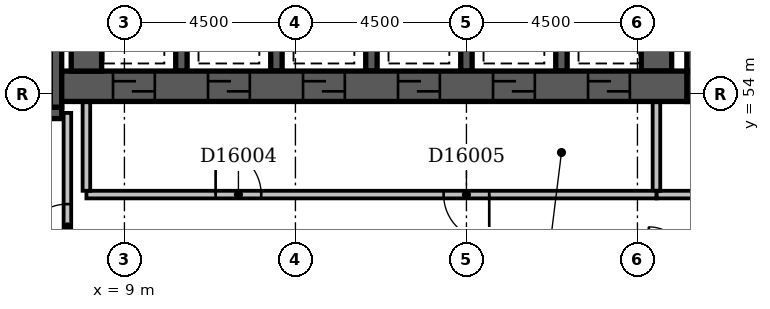
"""IFC4 building model, lengths in metres.
Left out: names, types, materials, properties, quantities, classifications, styles, units other than length and angle.
Written with IfcOpenShell. Run it as: python <this file> out.ifc"""

import sys

from ifc_helpers import new_model, si_unit, direction, frame, frame_2d, origin, place, context, subcontext, project, spatial, rectangle, extrude, element, fill, save


model = new_model("IFC4")
c1 = context("Model", 3, precision=1e-05, world=origin(), true_north=direction((0.0, 1.0)))
c2 = subcontext(c1, "Body", "Model", "MODEL_VIEW")
j1 = project(units=[si_unit("LENGTHUNIT", "METRE"), si_unit("PLANEANGLEUNIT", "RADIAN")], contexts=[c1])
p1 = place(None, origin())
s1 = spatial("IfcSite", under=j1, at=p1, CompositionType="ELEMENT")
p2 = place(p1, origin())
s2 = spatial("IfcBuilding", under=s1, at=p2, CompositionType="ELEMENT")
p3 = place(p2, frame((0.0, 0.0, 68.6)))
s3 = spatial("IfcBuildingStorey", under=s2, at=p3, CompositionType="ELEMENT", Elevation=68.6)
p4 = place(p3, frame((0.35, 53.5, -0.3), z_axis=(0.0, 0.0, 1.0), x_axis=(1.0, 0.0, 0.0)))
e1 = element("IfcWall", 1, at=p4, inside=s3, PredefinedType="SHEAR", context=c2, shape_type="SweptSolid", body=[
    extrude(rectangle(XDim=7.0, YDim=0.3, at=frame_2d((3.5, 0.0))), origin(), (0.0, 0.0, 1.0), 3.6),
])
p5 = place(p4, frame((5.58, 0.0, 0.3)))
e2 = element("IfcOpeningElement", 2, at=p5, cuts=e1, PredefinedType="OPENING", context=c2, shape_type="SweptSolid", body=[
    extrude(rectangle(XDim=1.1, YDim=2.1, at=frame_2d((0.55, 1.05))), frame((0.0, 0.162, 0.0), z_axis=(0.0, -1.0, 0.0), x_axis=(1.0, 0.0, 0.0)), (0.0, 0.0, 1.0), 0.324),
])
p6 = place(p3, frame((7.2, 53.65, -0.3), z_axis=(0.0, 0.0, 1.0), x_axis=(0.0, 1.0, 0.0)))
e3 = element("IfcWall", 3, at=p6, inside=s3, PredefinedType="SHEAR", context=c2, shape_type="SweptSolid", body=[
    extrude(rectangle(XDim=4.2, YDim=0.3, at=frame_2d((2.1, 0.0))), origin(), (0.0, 0.0, 1.0), 3.6),
])
p7 = place(p3, frame((7.35, 54.2, -0.3), z_axis=(0.0, 0.0, 1.0), x_axis=(1.0, 0.0, 0.0)))
e4 = element("IfcWall", 4, at=p7, inside=s3, PredefinedType="SHEAR", context=c2, shape_type="SweptSolid", body=[
    extrude(rectangle(XDim=16.45, YDim=0.8, at=frame_2d((8.225, 0.0))), origin(), (0.0, 0.0, 1.0), 3.6),
])
p8 = place(p7, frame((1.35, 0.0, 0.3)))
e5 = element("IfcOpeningElement", 5, at=p8, cuts=e4, PredefinedType="OPENING", context=c2, shape_type="SweptSolid", body=[
    extrude(rectangle(XDim=1.1, YDim=2.1, at=frame_2d((0.55, 1.05))), frame((0.0, 0.412, 0.0), z_axis=(0.0, -1.0, 0.0), x_axis=(1.0, 0.0, 0.0)), (0.0, 0.0, 1.0), 0.824),
])
p9 = place(p7, frame((3.85, 0.0, 0.3)))
e6 = element("IfcOpeningElement", 6, at=p9, cuts=e4, PredefinedType="OPENING", context=c2, shape_type="SweptSolid", body=[
    extrude(rectangle(XDim=1.1, YDim=2.1, at=frame_2d((0.55, 1.05))), frame((0.0, 0.412, 0.0), z_axis=(0.0, -1.0, 0.0), x_axis=(1.0, 0.0, 0.0)), (0.0, 0.0, 1.0), 0.824),
])
p10 = place(p7, frame((6.35, 0.0, 0.3)))
e7 = element("IfcOpeningElement", 7, at=p10, cuts=e4, PredefinedType="OPENING", context=c2, shape_type="SweptSolid", body=[
    extrude(rectangle(XDim=1.1, YDim=2.1, at=frame_2d((0.55, 1.05))), frame((0.0, 0.412, 0.0), z_axis=(0.0, -1.0, 0.0), x_axis=(1.0, 0.0, 0.0)), (0.0, 0.0, 1.0), 0.824),
])
p11 = place(p7, frame((8.85, 0.0, 0.3)))
e8 = element("IfcOpeningElement", 8, at=p11, cuts=e4, PredefinedType="OPENING", context=c2, shape_type="SweptSolid", body=[
    extrude(rectangle(XDim=1.1, YDim=2.1, at=frame_2d((0.55, 1.05))), frame((0.0, 0.412, 0.0), z_axis=(0.0, -1.0, 0.0), x_axis=(1.0, 0.0, 0.0)), (0.0, 0.0, 1.0), 0.824),
])
p12 = place(p7, frame((11.35, 0.0, 0.3)))
e9 = element("IfcOpeningElement", 9, at=p12, cuts=e4, PredefinedType="OPENING", context=c2, shape_type="SweptSolid", body=[
    extrude(rectangle(XDim=1.1, YDim=2.1, at=frame_2d((0.55, 1.05))), frame((0.0, 0.412, 0.0), z_axis=(0.0, -1.0, 0.0), x_axis=(1.0, 0.0, 0.0)), (0.0, 0.0, 1.0), 0.824),
])
p13 = place(p7, frame((13.85, 0.0, 0.3)))
e10 = element("IfcOpeningElement", 10, at=p13, cuts=e4, PredefinedType="OPENING", context=c2, shape_type="SweptSolid", body=[
    extrude(rectangle(XDim=1.1, YDim=2.1, at=frame_2d((0.55, 1.05))), frame((0.0, 0.412, 0.0), z_axis=(0.0, -1.0, 0.0), x_axis=(1.0, 0.0, 0.0)), (0.0, 0.0, 1.0), 0.824),
])
p14 = place(p3, frame((8.0, 54.6, -0.3), z_axis=(0.0, 0.0, 1.0), x_axis=(0.0, 1.0, 0.0)))
e11 = element("IfcWall", 11, at=p14, inside=s3, PredefinedType="SHEAR", context=c2, shape_type="SweptSolid", body=[
    extrude(rectangle(XDim=3.0, YDim=0.8, at=frame_2d((1.5, 0.0))), origin(), (0.0, 0.0, 1.0), 3.6),
])
for number, where, z_axis, x_axis in (
    (12, (10.5, 54.6, -0.3), (0.0, 0.0, 1.0), (0.0, 1.0, 0.0)),
    (13, (13.0, 54.6, -0.3), (0.0, 0.0, 1.0), (0.0, 1.0, 0.0)),
    (14, (15.5, 54.6, -0.3), (0.0, 0.0, 1.0), (0.0, 1.0, 0.0)),
    (15, (18.0, 54.6, -0.3), (0.0, 0.0, 1.0), (0.0, 1.0, 0.0)),
    (16, (20.5, 54.6, -0.3), (0.0, 0.0, 1.0), (0.0, 1.0, 0.0)),
):
    element("IfcWall", number, at=place(p3, frame(where, z_axis=z_axis, x_axis=x_axis)), inside=s3, PredefinedType="SHEAR", context=c2, shape_type="SweptSolid", body=[
        extrude(rectangle(XDim=3.0, YDim=0.3, at=frame_2d((1.5, 0.0))), origin(), (0.0, 0.0, 1.0), 3.6),
    ])
p15 = place(p3, frame((23.0, 54.6, -0.3), z_axis=(0.0, 0.0, 1.0), x_axis=(0.0, 1.0, 0.0)))
e17 = element("IfcWall", 17, at=p15, inside=s3, PredefinedType="SHEAR", context=c2, shape_type="SweptSolid", body=[
    extrude(rectangle(XDim=3.0, YDim=0.8, at=frame_2d((1.5, 0.0))), origin(), (0.0, 0.0, 1.0), 3.6),
])
p16 = place(p3, frame((23.8, 54.2, -0.3), z_axis=(0.0, 0.0, 1.0), x_axis=(1.0, 0.0, 0.0)))
e18 = element("IfcWall", 18, at=p16, inside=s3, PredefinedType="SHEAR", context=c2, shape_type="SweptSolid", body=[
    extrude(rectangle(XDim=3.3, YDim=0.8, at=frame_2d((1.65, 0.0))), origin(), (0.0, 0.0, 1.0), 3.6),
])
p17 = place(p16, frame((1.1, 0.0, 0.3)))
e19 = element("IfcOpeningElement", 19, at=p17, cuts=e18, PredefinedType="OPENING", context=c2, shape_type="SweptSolid", body=[
    extrude(rectangle(XDim=1.1, YDim=2.1, at=frame_2d((0.55, 1.05))), frame((0.0, 0.412, 0.0), z_axis=(0.0, -1.0, 0.0), x_axis=(1.0, 0.0, 0.0)), (0.0, 0.0, 1.0), 0.824),
])
p18 = place(p3, frame((24.2, 54.6, -0.3), z_axis=(0.0, 0.0, 1.0), x_axis=(0.0, 1.0, 0.0)))
e20 = element("IfcWall", 20, at=p18, inside=s3, PredefinedType="SHEAR", context=c2, shape_type="SweptSolid", body=[
    extrude(rectangle(XDim=3.0, YDim=0.8, at=frame_2d((1.5, 0.0))), origin(), (0.0, 0.0, 1.0), 3.6),
])
p19 = place(p3, frame((8.0, 51.35, 0.0), z_axis=(0.0, 0.0, 1.0), x_axis=(1.0, 0.0, 0.0)))
e21 = element("IfcWall", 21, at=p19, inside=s3, PredefinedType="PARTITIONING", context=c2, shape_type="SweptSolid", body=[
    extrude(rectangle(XDim=15.0, YDim=0.2, at=frame_2d((7.5, 0.0))), origin(), (0.0, 0.0, 1.0), 3.3),
])
p20 = place(p19, frame((3.4, 0.0, 0.0)))
e22 = element("IfcOpeningElement", 22, at=p20, cuts=e21, PredefinedType="OPENING", context=c2, shape_type="SweptSolid", body=[
    extrude(rectangle(XDim=1.2, YDim=2.1, at=frame_2d((0.6, 1.05))), frame((0.0, 0.112, 0.0), z_axis=(0.0, -1.0, 0.0), x_axis=(1.0, 0.0, 0.0)), (0.0, 0.0, 1.0), 0.224),
])
p21 = place(p19, frame((9.4, 0.0, 0.0)))
e23 = element("IfcOpeningElement", 23, at=p21, cuts=e21, PredefinedType="OPENING", context=c2, shape_type="SweptSolid", body=[
    extrude(rectangle(XDim=1.2, YDim=2.1, at=frame_2d((0.6, 1.05))), frame((0.0, 0.112, 0.0), z_axis=(0.0, -1.0, 0.0), x_axis=(1.0, 0.0, 0.0)), (0.0, 0.0, 1.0), 0.224),
])
for number, where, z_axis, x_axis in (
    (24, (23.0, 51.45, 0.0), (0.0, 0.0, 1.0), (0.0, 1.0, 0.0)),
    (25, (8.0, 51.45, 0.0), (0.0, 0.0, 1.0), (0.0, 1.0, 0.0)),
):
    element("IfcWall", number, at=place(p3, frame(where, z_axis=z_axis, x_axis=x_axis)), inside=s3, PredefinedType="PARTITIONING", context=c2, shape_type="SweptSolid", body=[
        extrude(rectangle(XDim=2.33, YDim=0.2, at=frame_2d((1.165, 0.0))), origin(), (0.0, 0.0, 1.0), 3.3),
    ])
p22 = place(p3, frame((23.0, 51.35, 0.0), z_axis=(0.0, 0.0, 1.0), x_axis=(1.0, 0.0, 0.0)))
e26 = element("IfcWall", 26, at=p22, inside=s3, PredefinedType="PARTITIONING", context=c2, shape_type="SweptSolid", body=[
    extrude(rectangle(XDim=4.8, YDim=0.2, at=frame_2d((2.4, 0.0))), origin(), (0.0, 0.0, 1.0), 3.3),
])
p23 = place(p22, frame((1.65, 0.0, 0.0)))
e27 = element("IfcOpeningElement", 27, at=p23, cuts=e26, PredefinedType="OPENING", context=c2, shape_type="SweptSolid", body=[
    extrude(rectangle(XDim=1.2, YDim=2.1, at=frame_2d((0.6, 1.05))), frame((0.0, 0.112, 0.0), z_axis=(0.0, -1.0, 0.0), x_axis=(1.0, 0.0, 0.0)), (0.0, 0.0, 1.0), 0.224),
])
p24 = place(p3, frame((7.5, 49.6, 0.0), z_axis=(0.0, 0.0, 1.0), x_axis=(0.0, 1.0, 0.0)))
e28 = element("IfcWall", 28, at=p24, inside=s3, PredefinedType="PARTITIONING", context=c2, shape_type="SweptSolid", body=[
    extrude(rectangle(XDim=3.9, YDim=0.2, at=frame_2d((1.95, 0.0))), origin(), (0.0, 0.0, 1.0), 3.3),
])
p25 = place(p24, frame((0.3, 0.0, 0.0)))
e29 = element("IfcOpeningElement", 29, at=p25, cuts=e28, PredefinedType="OPENING", context=c2, shape_type="SweptSolid", body=[
    extrude(rectangle(XDim=1.2, YDim=2.1, at=frame_2d((0.6, 1.05))), frame((0.0, 0.112, 0.0), z_axis=(0.0, -1.0, 0.0), x_axis=(1.0, 0.0, 0.0)), (0.0, 0.0, 1.0), 0.224),
])
p26 = place(p25, origin())
e30 = element("IfcDoor", 30, at=p26, inside=s3, OperationType="SINGLE_SWING_LEFT", PredefinedType="DOOR", context=c2, shape_type="SweptSolid", body=[
    extrude(rectangle(XDim=1.2, YDim=2.1, at=frame_2d((0.6, 1.05))), frame((0.0, 0.025, 0.0), z_axis=(0.0, -1.0, 0.0), x_axis=(1.0, 0.0, 0.0)), (0.0, 0.0, 1.0), 0.05),
])
fill(e29, e30)
p27 = place(p8, origin())
e31 = element("IfcDoor", 31, at=p27, inside=s3, OperationType="SLIDING_TO_LEFT", PredefinedType="DOOR", context=c2, shape_type="SweptSolid", body=[
    extrude(rectangle(XDim=1.1, YDim=2.1, at=frame_2d((0.55, 1.05))), frame((0.0, 0.025, 0.0), z_axis=(0.0, -1.0, 0.0), x_axis=(1.0, 0.0, 0.0)), (0.0, 0.0, 1.0), 0.05),
])
fill(e5, e31)
p28 = place(p9, origin())
e32 = element("IfcDoor", 32, at=p28, inside=s3, OperationType="SLIDING_TO_LEFT", PredefinedType="DOOR", context=c2, shape_type="SweptSolid", body=[
    extrude(rectangle(XDim=1.1, YDim=2.1, at=frame_2d((0.55, 1.05))), frame((0.0, 0.025, 0.0), z_axis=(0.0, -1.0, 0.0), x_axis=(1.0, 0.0, 0.0)), (0.0, 0.0, 1.0), 0.05),
])
fill(e6, e32)
p29 = place(p10, origin())
e33 = element("IfcDoor", 33, at=p29, inside=s3, OperationType="SLIDING_TO_LEFT", PredefinedType="DOOR", context=c2, shape_type="SweptSolid", body=[
    extrude(rectangle(XDim=1.1, YDim=2.1, at=frame_2d((0.55, 1.05))), frame((0.0, 0.025, 0.0), z_axis=(0.0, -1.0, 0.0), x_axis=(1.0, 0.0, 0.0)), (0.0, 0.0, 1.0), 0.05),
])
fill(e7, e33)
p30 = place(p11, origin())
e34 = element("IfcDoor", 34, at=p30, inside=s3, OperationType="SLIDING_TO_LEFT", PredefinedType="DOOR", context=c2, shape_type="SweptSolid", body=[
    extrude(rectangle(XDim=1.1, YDim=2.1, at=frame_2d((0.55, 1.05))), frame((0.0, 0.025, 0.0), z_axis=(0.0, -1.0, 0.0), x_axis=(1.0, 0.0, 0.0)), (0.0, 0.0, 1.0), 0.05),
])
fill(e8, e34)
p31 = place(p12, origin())
e35 = element("IfcDoor", 35, at=p31, inside=s3, OperationType="SLIDING_TO_LEFT", PredefinedType="DOOR", context=c2, shape_type="SweptSolid", body=[
    extrude(rectangle(XDim=1.1, YDim=2.1, at=frame_2d((0.55, 1.05))), frame((0.0, 0.025, 0.0), z_axis=(0.0, -1.0, 0.0), x_axis=(1.0, 0.0, 0.0)), (0.0, 0.0, 1.0), 0.05),
])
fill(e9, e35)
p32 = place(p13, origin())
e36 = element("IfcDoor", 36, at=p32, inside=s3, OperationType="SLIDING_TO_LEFT", PredefinedType="DOOR", context=c2, shape_type="SweptSolid", body=[
    extrude(rectangle(XDim=1.1, YDim=2.1, at=frame_2d((0.55, 1.05))), frame((0.0, 0.025, 0.0), z_axis=(0.0, -1.0, 0.0), x_axis=(1.0, 0.0, 0.0)), (0.0, 0.0, 1.0), 0.05),
])
fill(e10, e36)
p33 = place(p20, origin())
e37 = element("IfcDoor", 37, at=p33, inside=s3, OperationType="SINGLE_SWING_LEFT", PredefinedType="DOOR", context=c2, shape_type="SweptSolid", body=[
    extrude(rectangle(XDim=1.2, YDim=2.1, at=frame_2d((0.6, 1.05))), frame((0.0, 0.025, 0.0), z_axis=(0.0, -1.0, 0.0), x_axis=(1.0, 0.0, 0.0)), (0.0, 0.0, 1.0), 0.05),
])
fill(e22, e37)
p34 = place(p21, origin())
e38 = element("IfcDoor", 38, at=p34, inside=s3, OperationType="SINGLE_SWING_RIGHT", PredefinedType="DOOR", context=c2, shape_type="SweptSolid", body=[
    extrude(rectangle(XDim=1.2, YDim=2.1, at=frame_2d((0.6, 1.05))), frame((0.0, 0.025, 0.0), z_axis=(0.0, -1.0, 0.0), x_axis=(1.0, 0.0, 0.0)), (0.0, 0.0, 1.0), 0.05),
])
fill(e23, e38)
save(model, sys.argv[1])
